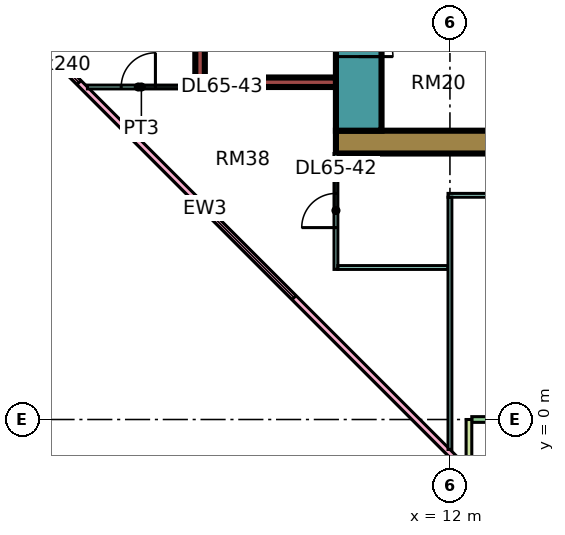
"""IFC4 building model, lengths in metres.
Left out: names, types, materials, properties, quantities, classifications, styles, units other than length and angle.
Written with IfcOpenShell. Run it as: python <this file> out.ifc"""

import sys

from ifc_helpers import new_model, si_unit, direction, frame, frame_2d, origin, place, context, subcontext, project, spatial, rectangle, extrude, element, fill, save


model = new_model("IFC4")
c1 = context("Model", 3, precision=1e-05, world=origin(), true_north=direction((0.0, 1.0)))
c2 = subcontext(c1, "Body", "Model", "MODEL_VIEW")
j1 = project(units=[si_unit("LENGTHUNIT", "METRE"), si_unit("PLANEANGLEUNIT", "RADIAN")], contexts=[c1])
p1 = place(None, origin())
s1 = spatial("IfcSite", under=j1, at=p1, CompositionType="ELEMENT")
p2 = place(p1, origin())
s2 = spatial("IfcBuilding", under=s1, at=p2, CompositionType="ELEMENT")
p3 = place(p2, frame((0.0, 0.0, 280.9)))
s3 = spatial("IfcBuildingStorey", under=s2, at=p3, CompositionType="ELEMENT", Elevation=280.9)
p4 = place(p3, frame((9.0, 7.3, 0.0), z_axis=(0.0, 0.0, 1.0), x_axis=(1.0, 0.0, 0.0)))
e1 = element("IfcWall", 1, at=p4, inside=s3, PredefinedType="SHEAR", context=c2, shape_type="SweptSolid", body=[
    extrude(rectangle(XDim=25.0, YDim=0.6, at=frame_2d((12.5, 0.0))), origin(), (0.0, 0.0, 1.0), 3.75),
])
p5 = place(p3, frame((9.6, 7.6, 0.0), z_axis=(0.0, 0.0, 1.0), x_axis=(0.0, 1.0, 0.0)))
e2 = element("IfcWall", 2, at=p5, inside=s3, PredefinedType="SHEAR", context=c2, shape_type="SweptSolid", body=[
    extrude(rectangle(XDim=11.8, YDim=1.2, at=frame_2d((5.9, 0.0))), origin(), (0.0, 0.0, 1.0), 3.75),
])
p6 = place(p5, frame((4.275, 0.0, 0.0)))
e3 = element("IfcOpeningElement", 3, at=p6, cuts=e2, PredefinedType="OPENING", context=c2, shape_type="SweptSolid", body=[
    extrude(rectangle(XDim=1.1, YDim=2.2, at=frame_2d((0.55, 1.1))), frame((0.0, 0.61, 0.0), z_axis=(0.0, -1.0, 0.0), x_axis=(1.0, 0.0, 0.0)), (0.0, 0.0, 1.0), 1.22),
])
p7 = place(p5, frame((6.775, 0.0, 0.0)))
e4 = element("IfcOpeningElement", 4, at=p7, cuts=e2, PredefinedType="OPENING", context=c2, shape_type="SweptSolid", body=[
    extrude(rectangle(XDim=1.1, YDim=2.2, at=frame_2d((0.55, 1.1))), frame((0.0, 0.61, 0.0), z_axis=(0.0, -1.0, 0.0), x_axis=(1.0, 0.0, 0.0)), (0.0, 0.0, 1.0), 1.22),
])
p8 = place(p5, frame((9.7, 0.0, 0.0)))
e5 = element("IfcOpeningElement", 5, at=p8, cuts=e2, PredefinedType="OPENING", context=c2, shape_type="SweptSolid", body=[
    extrude(rectangle(XDim=1.1, YDim=2.2, at=frame_2d((0.55, 1.1))), frame((0.0, 0.61, 0.0), z_axis=(0.0, -1.0, 0.0), x_axis=(1.0, 0.0, 0.0)), (0.0, 0.0, 1.0), 1.22),
])
p9 = place(p5, frame((1.95, 0.0, 0.0)))
e6 = element("IfcOpeningElement", 6, at=p9, cuts=e2, PredefinedType="OPENING", context=c2, shape_type="SweptSolid", body=[
    extrude(rectangle(XDim=0.9, YDim=2.1, at=frame_2d((0.45, 1.05))), frame((0.0, 0.61, 0.0), z_axis=(0.0, -1.0, 0.0), x_axis=(1.0, 0.0, 0.0)), (0.0, 0.0, 1.0), 1.22),
])
p10 = place(p3, frame((5.3, 8.875, 0.0), z_axis=(0.0, 0.0, 1.0), x_axis=(1.0, 0.0, 0.0)))
e7 = element("IfcWall", 7, at=p10, inside=s3, PredefinedType="SHEAR", context=c2, shape_type="SweptSolid", body=[
    extrude(rectangle(XDim=3.7, YDim=0.25, at=frame_2d((1.85, 0.0))), origin(), (0.0, 0.0, 1.0), 3.75),
])
p11 = place(p3, frame((5.425, 9.0, 0.0), z_axis=(0.0, 0.0, 1.0), x_axis=(0.0, 1.0, 0.0)))
e8 = element("IfcWall", 8, at=p11, inside=s3, PredefinedType="SHEAR", context=c2, shape_type="SweptSolid", body=[
    extrude(rectangle(XDim=4.0, YDim=0.25, at=frame_2d((2.0, 0.0))), origin(), (0.0, 0.0, 1.0), 3.75),
])
p12 = place(p3, frame((-1.447, 12.553, 0.0), z_axis=(0.0, 0.0, 1.0), x_axis=(0.707106781187, -0.707106781187, 0.0)))
e9 = element("IfcWall", 9, at=p12, inside=s3, PredefinedType="SOLIDWALL", context=c2, shape_type="SweptSolid", body=[
    extrude(rectangle(XDim=19.799, YDim=0.15, at=frame_2d((9.899, 0.0))), origin(), (0.0, 0.0, 1.0), 3.35),
])
p13 = place(p12, frame((2.212, 0.0, 0.45)))
e10 = element("IfcOpeningElement", 10, at=p13, cuts=e9, PredefinedType="OPENING", context=c2, shape_type="SweptSolid", body=[
    extrude(rectangle(XDim=3.0, YDim=2.4, at=frame_2d((1.5, 1.2))), frame((0.0, 0.085, 0.0), z_axis=(0.0, -1.0, 0.0), x_axis=(1.0, 0.0, 0.0)), (0.0, 0.0, 1.0), 0.17),
])
p14 = place(p12, frame((10.216, 0.0, 0.45)))
e11 = element("IfcOpeningElement", 11, at=p14, cuts=e9, PredefinedType="OPENING", context=c2, shape_type="SweptSolid", body=[
    extrude(rectangle(XDim=3.0, YDim=2.4, at=frame_2d((1.5, 1.2))), frame((0.0, 0.085, 0.0), z_axis=(0.0, -1.0, 0.0), x_axis=(1.0, 0.0, 0.0)), (0.0, 0.0, 1.0), 0.17),
])
p15 = place(p3, frame((12.575, 0.0, 0.0), z_axis=(0.0, 0.0, 1.0), x_axis=(1.0, 0.0, 0.0)))
e12 = element("IfcWall", 12, at=p15, inside=s3, PredefinedType="SOLIDWALL", context=c2, shape_type="SweptSolid", body=[
    extrude(rectangle(XDim=11.35, YDim=0.15, at=frame_2d((5.675, 0.0))), origin(), (0.0, 0.0, 1.0), 3.35),
])
p16 = place(p15, frame((3.312, 0.0, 0.0)))
e13 = element("IfcOpeningElement", 13, at=p16, cuts=e12, PredefinedType="OPENING", context=c2, shape_type="SweptSolid", body=[
    extrude(rectangle(XDim=1.8, YDim=2.4, at=frame_2d((0.9, 1.2))), frame((0.0, 0.085, 0.0), z_axis=(0.0, -1.0, 0.0), x_axis=(1.0, 0.0, 0.0)), (0.0, 0.0, 1.0), 0.17),
])
p17 = place(p15, frame((8.775, 0.0, 0.45)))
e14 = element("IfcOpeningElement", 14, at=p17, cuts=e12, PredefinedType="OPENING", context=c2, shape_type="SweptSolid", body=[
    extrude(rectangle(XDim=1.8, YDim=2.4, at=frame_2d((0.9, 1.2))), frame((0.0, 0.085, 0.0), z_axis=(0.0, -1.0, 0.0), x_axis=(1.0, 0.0, 0.0)), (0.0, 0.0, 1.0), 0.17),
])
p18 = place(p3, frame((12.5, -1.5, 0.0), z_axis=(0.0, 0.0, 1.0), x_axis=(0.0, 1.0, 0.0)))
e15 = element("IfcWall", 15, at=p18, inside=s3, PredefinedType="SOLIDWALL", context=c2, shape_type="SweptSolid", body=[
    extrude(rectangle(XDim=1.5, YDim=0.15, at=frame_2d((0.75, 0.0))), origin(), (0.0, 0.0, 1.0), 3.35),
])
p19 = place(p3, frame((2.461, 8.75, 0.0), z_axis=(0.0, 0.0, 1.0), x_axis=(1.0, 0.0, 0.0)))
e16 = element("IfcWall", 16, at=p19, inside=s3, PredefinedType="PARTITIONING", context=c2, shape_type="SweptSolid", body=[
    extrude(rectangle(XDim=2.839, YDim=0.1, at=frame_2d((1.419, 0.0))), origin(), (0.0, 0.0, 1.0), 3.35),
])
p20 = place(p19, frame((0.889, 0.0, 0.0)))
e17 = element("IfcOpeningElement", 17, at=p20, cuts=e16, PredefinedType="OPENING", context=c2, shape_type="SweptSolid", body=[
    extrude(rectangle(XDim=0.9, YDim=2.1, at=frame_2d((0.45, 1.05))), frame((0.0, 0.06, 0.0), z_axis=(0.0, -1.0, 0.0), x_axis=(1.0, 0.0, 0.0)), (0.0, 0.0, 1.0), 0.12),
])
p21 = place(p3, frame((9.0, 3.95, 0.0), z_axis=(0.0, 0.0, 1.0), x_axis=(0.0, 1.0, 0.0)))
e18 = element("IfcWall", 18, at=p21, inside=s3, PredefinedType="PARTITIONING", context=c2, shape_type="SweptSolid", body=[
    extrude(rectangle(XDim=3.05, YDim=0.1, at=frame_2d((1.525, 0.0))), origin(), (0.0, 0.0, 1.0), 3.35),
])
p22 = place(p21, frame((1.1, 0.0, 0.0)))
e19 = element("IfcOpeningElement", 19, at=p22, cuts=e18, PredefinedType="OPENING", context=c2, shape_type="SweptSolid", body=[
    extrude(rectangle(XDim=0.9, YDim=2.1, at=frame_2d((0.45, 1.05))), frame((0.0, 0.06, 0.0), z_axis=(0.0, -1.0, 0.0), x_axis=(1.0, 0.0, 0.0)), (0.0, 0.0, 1.0), 0.12),
])
p23 = place(p3, frame((9.05, 4.0, 0.0), z_axis=(0.0, 0.0, 1.0), x_axis=(1.0, 0.0, 0.0)))
e20 = element("IfcWall", 20, at=p23, inside=s3, PredefinedType="PARTITIONING", context=c2, shape_type="SweptSolid", body=[
    extrude(rectangle(XDim=2.9, YDim=0.1, at=frame_2d((1.45, 0.0))), origin(), (0.0, 0.0, 1.0), 3.35),
])
p24 = place(p3, frame((11.95, 5.9, 0.0), z_axis=(0.0, 0.0, 1.0), x_axis=(1.0, 0.0, 0.0)))
e21 = element("IfcWall", 21, at=p24, inside=s3, PredefinedType="PARTITIONING", context=c2, shape_type="SweptSolid", body=[
    extrude(rectangle(XDim=21.1, YDim=0.1, at=frame_2d((10.55, 0.0))), origin(), (0.0, 0.0, 1.0), 3.35),
])
p25 = place(p24, frame((10.1, 0.0, 0.0)))
e22 = element("IfcOpeningElement", 22, at=p25, cuts=e21, PredefinedType="OPENING", context=c2, shape_type="SweptSolid", body=[
    extrude(rectangle(XDim=0.9, YDim=2.1, at=frame_2d((0.45, 1.05))), frame((0.0, 0.06, 0.0), z_axis=(0.0, -1.0, 0.0), x_axis=(1.0, 0.0, 0.0)), (0.0, 0.0, 1.0), 0.12),
])
p26 = place(p24, frame((13.1, 0.0, 0.0)))
e23 = element("IfcOpeningElement", 23, at=p26, cuts=e21, PredefinedType="OPENING", context=c2, shape_type="SweptSolid", body=[
    extrude(rectangle(XDim=0.9, YDim=2.1, at=frame_2d((0.45, 1.05))), frame((0.0, 0.06, 0.0), z_axis=(0.0, -1.0, 0.0), x_axis=(1.0, 0.0, 0.0)), (0.0, 0.0, 1.0), 0.12),
])
p27 = place(p24, frame((16.1, 0.0, 0.0)))
e24 = element("IfcOpeningElement", 24, at=p27, cuts=e21, PredefinedType="OPENING", context=c2, shape_type="SweptSolid", body=[
    extrude(rectangle(XDim=0.9, YDim=2.1, at=frame_2d((0.45, 1.05))), frame((0.0, 0.06, 0.0), z_axis=(0.0, -1.0, 0.0), x_axis=(1.0, 0.0, 0.0)), (0.0, 0.0, 1.0), 0.12),
])
p28 = place(p24, frame((4.1, 0.0, 0.0)))
e25 = element("IfcOpeningElement", 25, at=p28, cuts=e21, PredefinedType="OPENING", context=c2, shape_type="SweptSolid", body=[
    extrude(rectangle(XDim=0.9, YDim=2.1, at=frame_2d((0.45, 1.05))), frame((0.0, 0.06, 0.0), z_axis=(0.0, -1.0, 0.0), x_axis=(1.0, 0.0, 0.0)), (0.0, 0.0, 1.0), 0.12),
])
p29 = place(p3, frame((12.0, -0.788, 0.0), z_axis=(0.0, 0.0, 1.0), x_axis=(0.0, 1.0, 0.0)))
e26 = element("IfcWall", 26, at=p29, inside=s3, PredefinedType="PARTITIONING", context=c2, shape_type="SweptSolid", body=[
    extrude(rectangle(XDim=6.638, YDim=0.1, at=frame_2d((3.319, 0.0))), origin(), (0.0, 0.0, 1.0), 3.35),
])
p30 = place(p13, origin())
e27 = element("IfcWindow", 27, at=p30, inside=s3, PartitioningType="SINGLE_PANEL", PredefinedType="WINDOW", context=c2, shape_type="SweptSolid", body=[
    extrude(rectangle(XDim=3.0, YDim=2.4, at=frame_2d((1.5, 1.2))), frame((0.0, 0.03, 0.0), z_axis=(0.0, -1.0, 0.0), x_axis=(1.0, 0.0, 0.0)), (0.0, 0.0, 1.0), 0.06),
])
fill(e10, e27)
p31 = place(p14, origin())
e28 = element("IfcWindow", 28, at=p31, inside=s3, PartitioningType="SINGLE_PANEL", PredefinedType="WINDOW", context=c2, shape_type="SweptSolid", body=[
    extrude(rectangle(XDim=3.0, YDim=2.4, at=frame_2d((1.5, 1.2))), frame((0.0, 0.03, 0.0), z_axis=(0.0, -1.0, 0.0), x_axis=(1.0, 0.0, 0.0)), (0.0, 0.0, 1.0), 0.06),
])
fill(e11, e28)
p32 = place(p9, frame((0.9, 0.0, 0.0), z_axis=(0.0, 0.0, 1.0), x_axis=(-1.0, 0.0, 0.0)))
e29 = element("IfcDoor", 29, at=p32, inside=s3, OperationType="SINGLE_SWING_LEFT", PredefinedType="DOOR", context=c2, shape_type="SweptSolid", body=[
    extrude(rectangle(XDim=0.9, YDim=2.1, at=frame_2d((0.45, 1.05))), frame((0.0, 0.025, 0.0), z_axis=(0.0, -1.0, 0.0), x_axis=(1.0, 0.0, 0.0)), (0.0, 0.0, 1.0), 0.05),
])
fill(e6, e29)
p33 = place(p22, origin())
e30 = element("IfcDoor", 30, at=p33, inside=s3, OperationType="SINGLE_SWING_LEFT", PredefinedType="DOOR", context=c2, shape_type="SweptSolid", body=[
    extrude(rectangle(XDim=0.9, YDim=2.1, at=frame_2d((0.45, 1.05))), frame((0.0, 0.025, 0.0), z_axis=(0.0, -1.0, 0.0), x_axis=(1.0, 0.0, 0.0)), (0.0, 0.0, 1.0), 0.05),
])
fill(e19, e30)
p34 = place(p20, frame((0.9, 0.0, 0.0), z_axis=(0.0, 0.0, 1.0), x_axis=(-1.0, 0.0, 0.0)))
e31 = element("IfcDoor", 31, at=p34, inside=s3, OperationType="SINGLE_SWING_RIGHT", PredefinedType="DOOR", context=c2, shape_type="SweptSolid", body=[
    extrude(rectangle(XDim=0.9, YDim=2.1, at=frame_2d((0.45, 1.05))), frame((0.0, 0.025, 0.0), z_axis=(0.0, -1.0, 0.0), x_axis=(1.0, 0.0, 0.0)), (0.0, 0.0, 1.0), 0.05),
])
fill(e17, e31)
save(model, sys.argv[1])
